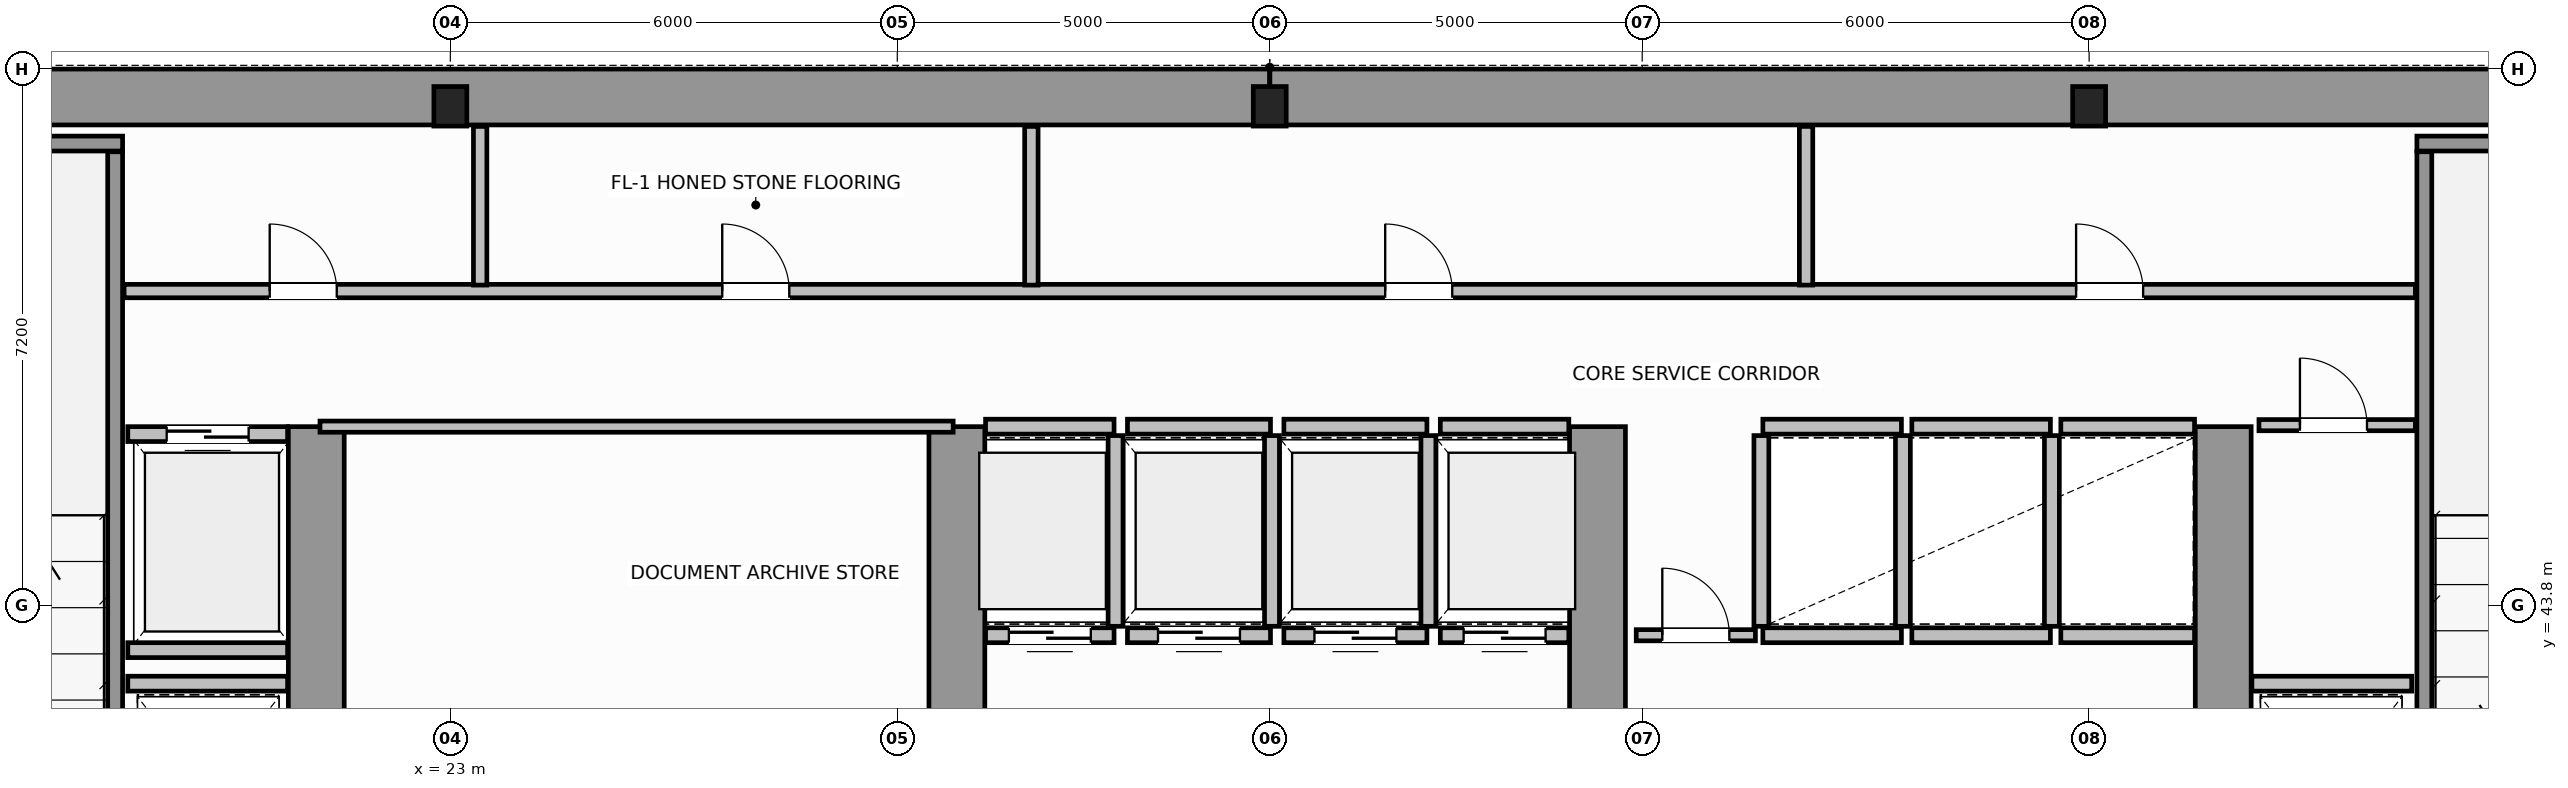
"""IFC4 building model, lengths in metres.
Left out: names, types, materials, properties, quantities, classifications, styles, units other than length and angle.
Written with IfcOpenShell. Run it as: python <this file> out.ifc"""

import sys

from ifc_helpers import new_model, si_unit, direction, frame, frame_2d, origin, origin_2d, place, context, subcontext, project, spatial, rectangle, i_section, extrude, source, transform, mapped, element, fill, save


model = new_model("IFC4")
c1 = context("Model", 3, precision=1e-05, world=origin(), true_north=direction((0.0, 1.0)))
c2 = subcontext(c1, "Body", "Model", "MODEL_VIEW")
j1 = project(units=[si_unit("LENGTHUNIT", "METRE"), si_unit("PLANEANGLEUNIT", "RADIAN")], contexts=[c1])
p1 = place(None, origin())
s1 = spatial("IfcSite", under=j1, at=p1, CompositionType="ELEMENT")
p2 = place(p1, origin())
s2 = spatial("IfcBuilding", under=s1, at=p2, CompositionType="ELEMENT")
p3 = place(p2, frame((0.0, 0.0, 130.0)))
s3 = spatial("IfcBuildingStorey", under=s2, at=p3, CompositionType="ELEMENT", Elevation=130.0)
m1 = source(origin(), c2, "Body", "SweptSolid", [
    extrude(i_section(OverallWidth=0.442, OverallDepth=0.531, WebThickness=0.065, FlangeThickness=0.076, FilletRadius=0.015, at=origin_2d()), origin(), (0.0, 0.0, 1.0), 3.8),
])
for number, where, z_axis, x_axis in (
    (1, (23.0, 50.5, 0.0), (0.0, 0.0, 1.0), (1.0, 0.0, 0.0)),
    (2, (34.0, 50.5, 0.0), (0.0, 0.0, 1.0), (1.0, 0.0, 0.0)),
    (3, (45.0, 50.5, 0.0), (0.0, 0.0, 1.0), (1.0, 0.0, 0.0)),
):
    element("IfcColumn", number, at=place(p3, frame(where, z_axis=z_axis, x_axis=x_axis)), inside=s3, PredefinedType="COLUMN", context=c2, shape_type="MappedRepresentation", body=[
        mapped(m1, transform((0.0, 0.0, 0.0), scale=1.0)),
    ])
for number, where, z_axis, x_axis in (
    (4, (14.379, 50.625, 0.0), (0.0, 0.0, 1.0), (1.0, 0.0, 0.0)),
    (5, (34.002, 50.625, 0.0), (0.0, 0.0, 1.0), (1.0, 0.0, 0.0)),
):
    element("IfcWall", number, at=place(p3, frame(where, z_axis=z_axis, x_axis=x_axis)), inside=s3, PredefinedType="SHEAR", context=c2, shape_type="SweptSolid", body=[
        extrude(rectangle(XDim=19.619, YDim=0.75, at=frame_2d((9.81, 0.0))), origin(), (0.0, 0.0, 1.0), 3.8),
    ])
for number, where, z_axis, x_axis in (
    (6, (21.2, 36.895, 0.0), (0.0, 0.0, 1.0), (0.0, 1.0, 0.0)),
    (7, (29.8, 36.895, 0.0), (0.0, 0.0, 1.0), (0.0, 1.0, 0.0)),
    (8, (38.4, 36.895, 0.0), (0.0, 0.0, 1.0), (0.0, 1.0, 0.0)),
    (9, (46.8, 36.895, 0.0), (0.0, 0.0, 1.0), (0.0, 1.0, 0.0)),
):
    element("IfcWall", number, at=place(p3, frame(where, z_axis=z_axis, x_axis=x_axis)), inside=s3, PredefinedType="SHEAR", context=c2, shape_type="SweptSolid", body=[
        extrude(rectangle(XDim=9.305, YDim=0.75, at=frame_2d((4.652, 0.0))), origin(), (0.0, 0.0, 1.0), 3.8),
    ])
p4 = place(p3, frame((14.375, 50.0, 0.0), z_axis=(0.0, 0.0, 1.0), x_axis=(1.0, 0.0, 0.0)))
e10 = element("IfcWall", 10, at=p4, inside=s3, PredefinedType="SOLIDWALL", context=c2, shape_type="SweptSolid", body=[
    extrude(rectangle(XDim=4.225, YDim=0.2, at=frame_2d((2.113, 0.0))), origin(), (0.0, 0.0, 1.0), 3.8),
])
p5 = place(p3, frame((18.5, 39.96, 0.0), z_axis=(0.0, 0.0, 1.0), x_axis=(0.0, 1.0, 0.0)))
e11 = element("IfcWall", 11, at=p5, inside=s3, PredefinedType="SOLIDWALL", context=c2, shape_type="SweptSolid", body=[
    extrude(rectangle(XDim=9.93, YDim=0.2, at=frame_2d((4.965, 0.0))), origin(), (0.0, 0.0, 1.0), 3.8),
])
p6 = place(p3, frame((49.4, 50.0, 0.0), z_axis=(0.0, 0.0, 1.0), x_axis=(1.0, 0.0, 0.0)))
e12 = element("IfcWall", 12, at=p6, inside=s3, PredefinedType="SOLIDWALL", context=c2, shape_type="SweptSolid", body=[
    extrude(rectangle(XDim=4.225, YDim=0.2, at=frame_2d((2.113, 0.0))), origin(), (0.0, 0.0, 1.0), 3.8),
])
p7 = place(p3, frame((49.5, 39.96, 0.0), z_axis=(0.0, 0.0, 1.0), x_axis=(0.0, 1.0, 0.0)))
e13 = element("IfcWall", 13, at=p7, inside=s3, PredefinedType="SOLIDWALL", context=c2, shape_type="SweptSolid", body=[
    extrude(rectangle(XDim=9.93, YDim=0.2, at=frame_2d((4.965, 0.0))), origin(), (0.0, 0.0, 1.0), 3.8),
])
p8 = place(p3, frame((30.185, 43.4, 0.0), z_axis=(0.0, 0.0, 1.0), x_axis=(1.0, 0.0, 0.0)))
e14 = element("IfcWall", 14, at=p8, inside=s3, PredefinedType="SOLIDWALL", context=c2, shape_type="SweptSolid", body=[
    extrude(rectangle(XDim=1.725, YDim=0.2, at=frame_2d((0.862, 0.0))), origin(), (0.0, 0.0, 1.0), 3.58),
])
p9 = place(p8, frame((0.313, 0.0, 0.0)))
e15 = element("IfcOpeningElement", 15, at=p9, cuts=e14, PredefinedType="OPENING", context=c2, shape_type="SweptSolid", body=[
    extrude(rectangle(XDim=1.1, YDim=2.15, at=frame_2d((0.55, 1.075))), frame((0.0, 0.11, 0.0), z_axis=(0.0, -1.0, 0.0), x_axis=(1.0, 0.0, 0.0)), (0.0, 0.0, 1.0), 0.22),
])
p10 = place(p3, frame((30.185, 46.2, 0.0), z_axis=(0.0, 0.0, 1.0), x_axis=(1.0, 0.0, 0.0)))
e16 = element("IfcWall", 16, at=p10, inside=s3, PredefinedType="SOLIDWALL", context=c2, shape_type="SweptSolid", body=[
    extrude(rectangle(XDim=1.725, YDim=0.2, at=frame_2d((0.862, 0.0))), origin(), (0.0, 0.0, 1.0), 3.58),
])
p11 = place(p3, frame((31.93, 43.52, 0.0), z_axis=(0.0, 0.0, 1.0), x_axis=(0.0, 1.0, 0.0)))
e17 = element("IfcWall", 17, at=p11, inside=s3, PredefinedType="SOLIDWALL", context=c2, shape_type="SweptSolid", body=[
    extrude(rectangle(XDim=2.56, YDim=0.2, at=frame_2d((1.28, 0.0))), origin(), (0.0, 0.0, 1.0), 3.58),
])
p12 = place(p3, frame((32.09, 43.4, 0.0), z_axis=(0.0, 0.0, 1.0), x_axis=(1.0, 0.0, 0.0)))
e18 = element("IfcWall", 18, at=p12, inside=s3, PredefinedType="SOLIDWALL", context=c2, shape_type="SweptSolid", body=[
    extrude(rectangle(XDim=1.92, YDim=0.2, at=frame_2d((0.96, 0.0))), origin(), (0.0, 0.0, 1.0), 3.58),
])
p13 = place(p12, frame((0.41, 0.0, 0.0)))
e19 = element("IfcOpeningElement", 19, at=p13, cuts=e18, PredefinedType="OPENING", context=c2, shape_type="SweptSolid", body=[
    extrude(rectangle(XDim=1.1, YDim=2.15, at=frame_2d((0.55, 1.075))), frame((0.0, 0.11, 0.0), z_axis=(0.0, -1.0, 0.0), x_axis=(1.0, 0.0, 0.0)), (0.0, 0.0, 1.0), 0.22),
])
p14 = place(p3, frame((32.09, 46.2, 0.0), z_axis=(0.0, 0.0, 1.0), x_axis=(1.0, 0.0, 0.0)))
e20 = element("IfcWall", 20, at=p14, inside=s3, PredefinedType="SOLIDWALL", context=c2, shape_type="SweptSolid", body=[
    extrude(rectangle(XDim=1.92, YDim=0.2, at=frame_2d((0.96, 0.0))), origin(), (0.0, 0.0, 1.0), 3.58),
])
p15 = place(p3, frame((34.03, 43.52, 0.0), z_axis=(0.0, 0.0, 1.0), x_axis=(0.0, 1.0, 0.0)))
e21 = element("IfcWall", 21, at=p15, inside=s3, PredefinedType="SOLIDWALL", context=c2, shape_type="SweptSolid", body=[
    extrude(rectangle(XDim=2.56, YDim=0.2, at=frame_2d((1.28, 0.0))), origin(), (0.0, 0.0, 1.0), 3.58),
])
p16 = place(p3, frame((34.19, 43.4, 0.0), z_axis=(0.0, 0.0, 1.0), x_axis=(1.0, 0.0, 0.0)))
e22 = element("IfcWall", 22, at=p16, inside=s3, PredefinedType="SOLIDWALL", context=c2, shape_type="SweptSolid", body=[
    extrude(rectangle(XDim=1.92, YDim=0.2, at=frame_2d((0.96, 0.0))), origin(), (0.0, 0.0, 1.0), 3.58),
])
p17 = place(p16, frame((0.41, 0.0, 0.0)))
e23 = element("IfcOpeningElement", 23, at=p17, cuts=e22, PredefinedType="OPENING", context=c2, shape_type="SweptSolid", body=[
    extrude(rectangle(XDim=1.1, YDim=2.15, at=frame_2d((0.55, 1.075))), frame((0.0, 0.11, 0.0), z_axis=(0.0, -1.0, 0.0), x_axis=(1.0, 0.0, 0.0)), (0.0, 0.0, 1.0), 0.22),
])
p18 = place(p3, frame((34.19, 46.2, 0.0), z_axis=(0.0, 0.0, 1.0), x_axis=(1.0, 0.0, 0.0)))
e24 = element("IfcWall", 24, at=p18, inside=s3, PredefinedType="SOLIDWALL", context=c2, shape_type="SweptSolid", body=[
    extrude(rectangle(XDim=1.92, YDim=0.2, at=frame_2d((0.96, 0.0))), origin(), (0.0, 0.0, 1.0), 3.58),
])
p19 = place(p3, frame((36.13, 43.52, 0.0), z_axis=(0.0, 0.0, 1.0), x_axis=(0.0, 1.0, 0.0)))
e25 = element("IfcWall", 25, at=p19, inside=s3, PredefinedType="SOLIDWALL", context=c2, shape_type="SweptSolid", body=[
    extrude(rectangle(XDim=2.56, YDim=0.2, at=frame_2d((1.28, 0.0))), origin(), (0.0, 0.0, 1.0), 3.58),
])
p20 = place(p3, frame((36.29, 43.4, 0.0), z_axis=(0.0, 0.0, 1.0), x_axis=(1.0, 0.0, 0.0)))
e26 = element("IfcWall", 26, at=p20, inside=s3, PredefinedType="SOLIDWALL", context=c2, shape_type="SweptSolid", body=[
    extrude(rectangle(XDim=1.725, YDim=0.2, at=frame_2d((0.862, 0.0))), origin(), (0.0, 0.0, 1.0), 3.58),
])
p21 = place(p20, frame((0.313, 0.0, 0.0)))
e27 = element("IfcOpeningElement", 27, at=p21, cuts=e26, PredefinedType="OPENING", context=c2, shape_type="SweptSolid", body=[
    extrude(rectangle(XDim=1.1, YDim=2.15, at=frame_2d((0.55, 1.075))), frame((0.0, 0.11, 0.0), z_axis=(0.0, -1.0, 0.0), x_axis=(1.0, 0.0, 0.0)), (0.0, 0.0, 1.0), 0.22),
])
p22 = place(p3, frame((36.29, 46.2, 0.0), z_axis=(0.0, 0.0, 1.0), x_axis=(1.0, 0.0, 0.0)))
e28 = element("IfcWall", 28, at=p22, inside=s3, PredefinedType="SOLIDWALL", context=c2, shape_type="SweptSolid", body=[
    extrude(rectangle(XDim=1.725, YDim=0.2, at=frame_2d((0.862, 0.0))), origin(), (0.0, 0.0, 1.0), 3.58),
])
for number, where, z_axis, x_axis in (
    (29, (40.62, 43.4, 0.0), (0.0, 0.0, 1.0), (1.0, 0.0, 0.0)),
    (30, (40.62, 46.2, 0.0), (0.0, 0.0, 1.0), (1.0, 0.0, 0.0)),
):
    element("IfcWall", number, at=place(p3, frame(where, z_axis=z_axis, x_axis=x_axis)), inside=s3, PredefinedType="SOLIDWALL", context=c2, shape_type="SweptSolid", body=[
        extrude(rectangle(XDim=1.86, YDim=0.2, at=frame_2d((0.93, 0.0))), origin(), (0.0, 0.0, 1.0), 3.58),
    ])
for number, where, z_axis, x_axis in (
    (31, (40.6, 43.52, 0.0), (0.0, 0.0, 1.0), (0.0, 1.0, 0.0)),
    (32, (42.5, 43.52, 0.0), (0.0, 0.0, 1.0), (0.0, 1.0, 0.0)),
):
    element("IfcWall", number, at=place(p3, frame(where, z_axis=z_axis, x_axis=x_axis)), inside=s3, PredefinedType="SOLIDWALL", context=c2, shape_type="SweptSolid", body=[
        extrude(rectangle(XDim=2.56, YDim=0.2, at=frame_2d((1.28, 0.0))), origin(), (0.0, 0.0, 1.0), 3.58),
    ])
for number, where, z_axis, x_axis in (
    (33, (42.62, 43.4, 0.0), (0.0, 0.0, 1.0), (1.0, 0.0, 0.0)),
    (34, (42.62, 46.2, 0.0), (0.0, 0.0, 1.0), (1.0, 0.0, 0.0)),
):
    element("IfcWall", number, at=place(p3, frame(where, z_axis=z_axis, x_axis=x_axis)), inside=s3, PredefinedType="SOLIDWALL", context=c2, shape_type="SweptSolid", body=[
        extrude(rectangle(XDim=1.86, YDim=0.2, at=frame_2d((0.93, 0.0))), origin(), (0.0, 0.0, 1.0), 3.58),
    ])
p23 = place(p3, frame((44.5, 43.52, 0.0), z_axis=(0.0, 0.0, 1.0), x_axis=(0.0, 1.0, 0.0)))
e35 = element("IfcWall", 35, at=p23, inside=s3, PredefinedType="SOLIDWALL", context=c2, shape_type="SweptSolid", body=[
    extrude(rectangle(XDim=2.56, YDim=0.2, at=frame_2d((1.28, 0.0))), origin(), (0.0, 0.0, 1.0), 3.58),
])
for number, where, z_axis, x_axis in (
    (36, (44.62, 43.4, 0.0), (0.0, 0.0, 1.0), (1.0, 0.0, 0.0)),
    (37, (44.62, 46.2, 0.0), (0.0, 0.0, 1.0), (1.0, 0.0, 0.0)),
):
    element("IfcWall", number, at=place(p3, frame(where, z_axis=z_axis, x_axis=x_axis)), inside=s3, PredefinedType="SOLIDWALL", context=c2, shape_type="SweptSolid", body=[
        extrude(rectangle(XDim=1.795, YDim=0.2, at=frame_2d((0.897, 0.0))), origin(), (0.0, 0.0, 1.0), 3.58),
    ])
p24 = place(p3, frame((18.67, 46.1, 0.0), z_axis=(0.0, 0.0, 1.0), x_axis=(1.0, 0.0, 0.0)))
e38 = element("IfcWall", 38, at=p24, inside=s3, PredefinedType="SOLIDWALL", context=c2, shape_type="SweptSolid", body=[
    extrude(rectangle(XDim=2.145, YDim=0.2, at=frame_2d((1.073, 0.0))), origin(), (0.0, 0.0, 1.0), 3.58),
])
p25 = place(p24, frame((0.522, 0.0, 0.0)))
e39 = element("IfcOpeningElement", 39, at=p25, cuts=e38, PredefinedType="OPENING", context=c2, shape_type="SweptSolid", body=[
    extrude(rectangle(XDim=1.1, YDim=2.15, at=frame_2d((0.55, 1.075))), frame((0.0, 0.11, 0.0), z_axis=(0.0, -1.0, 0.0), x_axis=(1.0, 0.0, 0.0)), (0.0, 0.0, 1.0), 0.22),
])
for number, where, z_axis, x_axis in (
    (40, (18.67, 43.2, 0.0), (0.0, 0.0, 1.0), (1.0, 0.0, 0.0)),
    (41, (18.67, 42.75, 0.0), (0.0, 0.0, 1.0), (1.0, 0.0, 0.0)),
    (42, (47.185, 42.75, 0.0), (0.0, 0.0, 1.0), (1.0, 0.0, 0.0)),
):
    element("IfcWall", number, at=place(p3, frame(where, z_axis=z_axis, x_axis=x_axis)), inside=s3, PredefinedType="SOLIDWALL", context=c2, shape_type="SweptSolid", body=[
        extrude(rectangle(XDim=2.145, YDim=0.2, at=frame_2d((1.073, 0.0))), origin(), (0.0, 0.0, 1.0), 3.58),
    ])
p26 = place(p3, frame((21.25, 46.2, 0.0), z_axis=(0.0, 0.0, 1.0), x_axis=(1.0, 0.0, 0.0)))
e43 = element("IfcWall", 43, at=p26, inside=s3, PredefinedType="PARTITIONING", context=c2, shape_type="SweptSolid", body=[
    extrude(rectangle(XDim=8.5, YDim=0.15, at=frame_2d((4.25, 0.0))), origin(), (0.0, 0.0, 1.0), 3.58),
])
p27 = place(p3, frame((47.28, 46.22, 0.0), z_axis=(0.0, 0.0, 1.0), x_axis=(1.0, 0.0, 0.0)))
e44 = element("IfcWall", 44, at=p27, inside=s3, PredefinedType="PARTITIONING", context=c2, shape_type="SweptSolid", body=[
    extrude(rectangle(XDim=2.1, YDim=0.15, at=frame_2d((1.05, 0.0))), origin(), (0.0, 0.0, 1.0), 3.58),
])
p28 = place(p27, frame((0.55, 0.0, 0.0)))
e45 = element("IfcOpeningElement", 45, at=p28, cuts=e44, PredefinedType="OPENING", context=c2, shape_type="SweptSolid", body=[
    extrude(rectangle(XDim=0.9, YDim=2.1, at=frame_2d((0.45, 1.05))), frame((0.0, 0.085, 0.0), z_axis=(0.0, -1.0, 0.0), x_axis=(1.0, 0.0, 0.0)), (0.0, 0.0, 1.0), 0.17),
])
p29 = place(p3, frame((38.92, 43.4, 0.0), z_axis=(0.0, 0.0, 1.0), x_axis=(1.0, 0.0, 0.0)))
e46 = element("IfcWall", 46, at=p29, inside=s3, PredefinedType="PARTITIONING", context=c2, shape_type="SweptSolid", body=[
    extrude(rectangle(XDim=1.6, YDim=0.15, at=frame_2d((0.8, 0.0))), origin(), (0.0, 0.0, 1.0), 3.58),
])
p30 = place(p29, frame((0.35, 0.0, 0.0)))
e47 = element("IfcOpeningElement", 47, at=p30, cuts=e46, PredefinedType="OPENING", context=c2, shape_type="SweptSolid", body=[
    extrude(rectangle(XDim=0.9, YDim=2.1, at=frame_2d((0.45, 1.05))), frame((0.0, 0.085, 0.0), z_axis=(0.0, -1.0, 0.0), x_axis=(1.0, 0.0, 0.0)), (0.0, 0.0, 1.0), 0.17),
])
p31 = place(p3, frame((18.62, 48.02, 0.0), z_axis=(0.0, 0.0, 1.0), x_axis=(1.0, 0.0, 0.0)))
e48 = element("IfcWall", 48, at=p31, inside=s3, PredefinedType="PLUMBINGWALL", context=c2, shape_type="SweptSolid", body=[
    extrude(rectangle(XDim=30.76, YDim=0.18, at=frame_2d((15.38, 0.0))), origin(), (0.0, 0.0, 1.0), 3.58),
])
p32 = place(p31, frame((1.955, 0.0, 0.0)))
e49 = element("IfcOpeningElement", 49, at=p32, cuts=e48, PredefinedType="OPENING", context=c2, shape_type="SweptSolid", body=[
    extrude(rectangle(XDim=0.9, YDim=2.15, at=frame_2d((0.45, 1.075))), frame((0.0, 0.1, 0.0), z_axis=(0.0, -1.0, 0.0), x_axis=(1.0, 0.0, 0.0)), (0.0, 0.0, 1.0), 0.2),
])
p33 = place(p31, frame((8.03, 0.0, 0.0)))
e50 = element("IfcOpeningElement", 50, at=p33, cuts=e48, PredefinedType="OPENING", context=c2, shape_type="SweptSolid", body=[
    extrude(rectangle(XDim=0.9, YDim=2.15, at=frame_2d((0.45, 1.075))), frame((0.0, 0.1, 0.0), z_axis=(0.0, -1.0, 0.0), x_axis=(1.0, 0.0, 0.0)), (0.0, 0.0, 1.0), 0.2),
])
p34 = place(p31, frame((16.93, 0.0, 0.0)))
e51 = element("IfcOpeningElement", 51, at=p34, cuts=e48, PredefinedType="OPENING", context=c2, shape_type="SweptSolid", body=[
    extrude(rectangle(XDim=0.9, YDim=2.15, at=frame_2d((0.45, 1.075))), frame((0.0, 0.1, 0.0), z_axis=(0.0, -1.0, 0.0), x_axis=(1.0, 0.0, 0.0)), (0.0, 0.0, 1.0), 0.2),
])
p35 = place(p31, frame((26.205, 0.0, 0.0)))
e52 = element("IfcOpeningElement", 52, at=p35, cuts=e48, PredefinedType="OPENING", context=c2, shape_type="SweptSolid", body=[
    extrude(rectangle(XDim=0.9, YDim=2.15, at=frame_2d((0.45, 1.075))), frame((0.0, 0.1, 0.0), z_axis=(0.0, -1.0, 0.0), x_axis=(1.0, 0.0, 0.0)), (0.0, 0.0, 1.0), 0.2),
])
for number, where, z_axis, x_axis in (
    (53, (23.4, 48.1, 0.0), (0.0, 0.0, 1.0), (0.0, 1.0, 0.0)),
    (54, (30.8, 48.1, 0.0), (0.0, 0.0, 1.0), (0.0, 1.0, 0.0)),
    (55, (41.2, 48.1, 0.0), (0.0, 0.0, 1.0), (0.0, 1.0, 0.0)),
):
    element("IfcWall", number, at=place(p3, frame(where, z_axis=z_axis, x_axis=x_axis)), inside=s3, PredefinedType="PLUMBINGWALL", context=c2, shape_type="SweptSolid", body=[
        extrude(rectangle(XDim=2.13, YDim=0.18, at=frame_2d((1.065, 0.0))), origin(), (0.0, 0.0, 1.0), 3.58),
    ])
m2 = source(origin(), c2, "Body", "SweptSolid", [
    extrude(rectangle(XDim=1.1, YDim=2.15, at=frame_2d((0.55, 1.075))), frame((0.0, 0.025, 0.0), z_axis=(0.0, -1.0, 0.0), x_axis=(1.0, 0.0, 0.0)), (0.0, 0.0, 1.0), 0.05),
])
p36 = place(p9, origin())
e56 = element("IfcDoor", 56, at=p36, inside=s3, OperationType="DOUBLE_DOOR_SLIDING", PredefinedType="DOOR", context=c2, shape_type="MappedRepresentation", body=[
    mapped(m2, transform((0.0, 0.0, 0.0), scale=1.0)),
])
fill(e15, e56)
p37 = place(p13, origin())
e57 = element("IfcDoor", 57, at=p37, inside=s3, OperationType="DOUBLE_DOOR_SLIDING", PredefinedType="DOOR", context=c2, shape_type="MappedRepresentation", body=[
    mapped(m2, transform((0.0, 0.0, 0.0), scale=1.0)),
])
fill(e19, e57)
p38 = place(p17, origin())
e58 = element("IfcDoor", 58, at=p38, inside=s3, OperationType="DOUBLE_DOOR_SLIDING", PredefinedType="DOOR", context=c2, shape_type="MappedRepresentation", body=[
    mapped(m2, transform((0.0, 0.0, 0.0), scale=1.0)),
])
fill(e23, e58)
p39 = place(p21, origin())
e59 = element("IfcDoor", 59, at=p39, inside=s3, OperationType="DOUBLE_DOOR_SLIDING", PredefinedType="DOOR", context=c2, shape_type="MappedRepresentation", body=[
    mapped(m2, transform((0.0, 0.0, 0.0), scale=1.0)),
])
fill(e27, e59)
p40 = place(p25, origin())
e60 = element("IfcDoor", 60, at=p40, inside=s3, OperationType="DOUBLE_DOOR_SLIDING", PredefinedType="DOOR", context=c2, shape_type="MappedRepresentation", body=[
    mapped(m2, transform((0.0, 0.0, 0.0), scale=1.0)),
])
fill(e39, e60)
m3 = source(origin(), c2, "Body", "SweptSolid", [
    extrude(rectangle(XDim=0.9, YDim=2.1, at=frame_2d((0.45, 1.05))), frame((0.0, 0.025, 0.0), z_axis=(0.0, -1.0, 0.0), x_axis=(1.0, 0.0, 0.0)), (0.0, 0.0, 1.0), 0.05),
])
p41 = place(p28, origin())
e61 = element("IfcDoor", 61, at=p41, inside=s3, OperationType="SINGLE_SWING_RIGHT", PredefinedType="DOOR", context=c2, shape_type="MappedRepresentation", body=[
    mapped(m3, transform((0.0, 0.0, 0.0), scale=1.0)),
])
fill(e45, e61)
p42 = place(p30, origin())
e62 = element("IfcDoor", 62, at=p42, inside=s3, OperationType="SINGLE_SWING_LEFT", PredefinedType="DOOR", context=c2, shape_type="MappedRepresentation", body=[
    mapped(m3, transform((0.0, 0.0, 0.0), scale=1.0)),
])
fill(e47, e62)
m4 = source(origin(), c2, "Body", "SweptSolid", [
    extrude(rectangle(XDim=0.9, YDim=2.15, at=frame_2d((0.45, 1.075))), frame((0.0, 0.025, 0.0), z_axis=(0.0, -1.0, 0.0), x_axis=(1.0, 0.0, 0.0)), (0.0, 0.0, 1.0), 0.05),
])
p43 = place(p32, origin())
e63 = element("IfcDoor", 63, at=p43, inside=s3, OperationType="SINGLE_SWING_LEFT", PredefinedType="DOOR", context=c2, shape_type="MappedRepresentation", body=[
    mapped(m4, transform((0.0, 0.0, 0.0), scale=1.0)),
])
fill(e49, e63)
p44 = place(p33, origin())
e64 = element("IfcDoor", 64, at=p44, inside=s3, OperationType="SINGLE_SWING_RIGHT", PredefinedType="DOOR", context=c2, shape_type="MappedRepresentation", body=[
    mapped(m4, transform((0.0, 0.0, 0.0), scale=1.0)),
])
fill(e50, e64)
p45 = place(p34, origin())
e65 = element("IfcDoor", 65, at=p45, inside=s3, OperationType="SINGLE_SWING_LEFT", PredefinedType="DOOR", context=c2, shape_type="MappedRepresentation", body=[
    mapped(m4, transform((0.0, 0.0, 0.0), scale=1.0)),
])
fill(e51, e65)
p46 = place(p35, origin())
e66 = element("IfcDoor", 66, at=p46, inside=s3, OperationType="SINGLE_SWING_RIGHT", PredefinedType="DOOR", context=c2, shape_type="MappedRepresentation", body=[
    mapped(m4, transform((0.0, 0.0, 0.0), scale=1.0)),
])
fill(e52, e66)
save(model, sys.argv[1])
